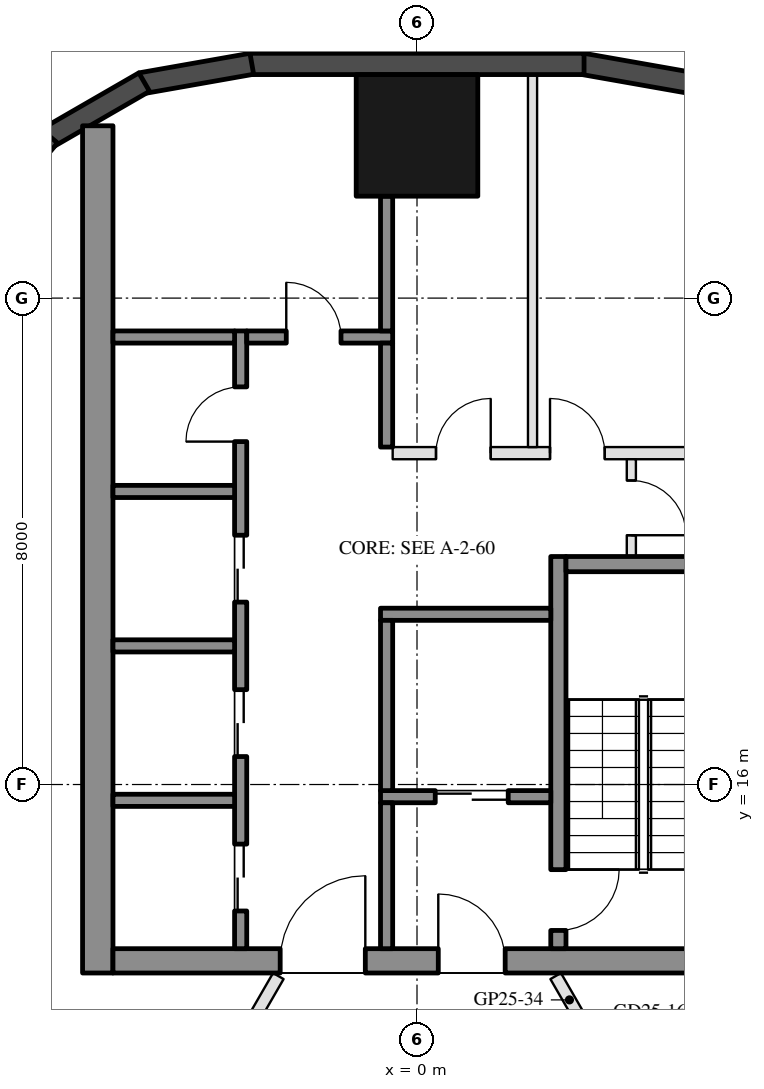
"""IFC4 building model, lengths in metres.
Left out: names, types, materials, properties, quantities, classifications, styles, units other than length and angle.
Written with IfcOpenShell. Run it as: python <this file> out.ifc"""

import sys

from ifc_helpers import new_model, si_unit, direction, frame, frame_2d, origin, origin_2d, place, context, subcontext, project, spatial, rectangle, hollow_rectangle, extrude, boolean, halfspace, element, fill, save


model = new_model("IFC4")
c1 = context("Model", 3, precision=1e-05, world=origin(), true_north=direction((0.0, 1.0)))
c2 = subcontext(c1, "Body", "Model", "MODEL_VIEW")
j1 = project(units=[si_unit("LENGTHUNIT", "METRE"), si_unit("PLANEANGLEUNIT", "RADIAN")], contexts=[c1])
p1 = place(None, origin())
s1 = spatial("IfcSite", under=j1, at=p1, CompositionType="ELEMENT")
p2 = place(p1, origin())
s2 = spatial("IfcBuilding", under=s1, at=p2, CompositionType="ELEMENT")
p3 = place(p2, frame((0.0, 0.0, 257.8)))
s3 = spatial("IfcBuildingStorey", under=s2, at=p3, CompositionType="ELEMENT", Elevation=257.8)
p4 = place(p3, frame((0.0, 26.676, 0.0), z_axis=(0.0, 0.0, 1.0), x_axis=(1.0, 0.0, 0.0)))
e1 = element("IfcColumn", 1, at=p4, inside=s3, PredefinedType="COLUMN", context=c2, shape_type="SweptSolid", body=[
    boolean("DIFFERENCE", extrude(hollow_rectangle(XDim=2.0, YDim=2.0, WallThickness=0.05, at=origin_2d()), origin(), (0.0, 0.0, 1.0), 3.7), halfspace(frame((0.0, 0.0, 0.112), z_axis=(0.0, 0.0, 1.0), x_axis=(1.0, 0.0, 0.0)), True)),
])
p5 = place(p3, frame((6.093, 26.625, 0.0), z_axis=(0.0, 0.0, 1.0), x_axis=(-0.866080385203, 0.499904757295, 0.0)))
e2 = element("IfcWall", 2, at=p5, inside=s3, PredefinedType="SOLIDWALL", context=c2, shape_type="SweptSolid", body=[
    extrude(rectangle(XDim=1.855, YDim=0.35, at=frame_2d((0.927, 0.0))), origin(), (0.0, 0.0, 1.0), 3.55),
])
p6 = place(p3, frame((4.544, 27.532, 0.0), z_axis=(0.0, 0.0, 1.0), x_axis=(-0.984795480386, 0.173717764815, 0.0)))
e3 = element("IfcWall", 3, at=p6, inside=s3, PredefinedType="SOLIDWALL", context=c2, shape_type="SweptSolid", body=[
    extrude(rectangle(XDim=1.855, YDim=0.35, at=frame_2d((0.928, 0.0))), origin(), (0.0, 0.0, 1.0), 3.55),
])
p7 = place(p3, frame((2.747, 27.851, 0.0), z_axis=(0.0, 0.0, 1.0), x_axis=(-1.0, 0.0, 0.0)))
e4 = element("IfcWall", 4, at=p7, inside=s3, PredefinedType="SOLIDWALL", context=c2, shape_type="SweptSolid", body=[
    extrude(rectangle(XDim=5.495, YDim=0.35, at=frame_2d((2.747, 0.0))), origin(), (0.0, 0.0, 1.0), 3.55),
])
p8 = place(p3, frame((-2.717, 27.854, 0.0), z_axis=(0.0, 0.0, 1.0), x_axis=(-0.984795480386, -0.173717764815, 0.0)))
e5 = element("IfcWall", 5, at=p8, inside=s3, PredefinedType="SOLIDWALL", context=c2, shape_type="SweptSolid", body=[
    extrude(rectangle(XDim=1.855, YDim=0.35, at=frame_2d((0.928, 0.0))), origin(), (0.0, 0.0, 1.0), 3.55),
])
p9 = place(p3, frame((-4.487, 27.552, 0.0), z_axis=(0.0, 0.0, 1.0), x_axis=(-0.866080385203, -0.499904757295, 0.0)))
e6 = element("IfcWall", 6, at=p9, inside=s3, PredefinedType="SOLIDWALL", context=c2, shape_type="SweptSolid", body=[
    extrude(rectangle(XDim=1.855, YDim=0.35, at=frame_2d((0.927, 0.0))), origin(), (0.0, 0.0, 1.0), 3.55),
])
p10 = place(p3, frame((-6.046, 26.664, 0.0), z_axis=(0.0, 0.0, 1.0), x_axis=(-0.642756798522, -0.7660702957, 0.0)))
e7 = element("IfcWall", 7, at=p10, inside=s3, PredefinedType="SOLIDWALL", context=c2, shape_type="SweptSolid", body=[
    extrude(rectangle(XDim=1.855, YDim=0.35, at=frame_2d((0.928, 0.0))), origin(), (0.0, 0.0, 1.0), 3.55),
])
p11 = place(p3, frame((-5.25, 12.9, 0.0), z_axis=(0.0, 0.0, 1.0), x_axis=(0.0, 1.0, 0.0)))
e8 = element("IfcWall", 8, at=p11, inside=s3, PredefinedType="SHEAR", context=c2, shape_type="SweptSolid", body=[
    extrude(rectangle(XDim=13.934, YDim=0.5, at=frame_2d((6.967, 0.0))), origin(), (0.0, 0.0, 1.0), 3.5),
])
p12 = place(p3, frame((5.0, 13.1, 0.0), z_axis=(0.0, 0.0, 1.0), x_axis=(-1.0, 0.0, 0.0)))
e9 = element("IfcWall", 9, at=p12, inside=s3, PredefinedType="SHEAR", context=c2, shape_type="SweptSolid", body=[
    extrude(rectangle(XDim=10.0, YDim=0.4, at=frame_2d((5.0, 0.0))), origin(), (0.0, 0.0, 1.0), 3.5),
])
p13 = place(p12, frame((3.55, 0.0, 0.0)))
e10 = element("IfcOpeningElement", 10, at=p13, cuts=e9, PredefinedType="OPENING", context=c2, shape_type="SweptSolid", body=[
    extrude(rectangle(XDim=1.1, YDim=2.1, at=frame_2d((0.55, 1.05))), frame((0.0, 0.21, 0.0), z_axis=(0.0, -1.0, 0.0), x_axis=(1.0, 0.0, 0.0)), (0.0, 0.0, 1.0), 0.42),
])
p14 = place(p12, frame((5.85, 0.0, 0.0)))
e11 = element("IfcOpeningElement", 11, at=p14, cuts=e9, PredefinedType="OPENING", context=c2, shape_type="SweptSolid", body=[
    extrude(rectangle(XDim=1.4, YDim=2.1, at=frame_2d((0.7, 1.05))), frame((0.0, 0.21, 0.0), z_axis=(0.0, -1.0, 0.0), x_axis=(1.0, 0.0, 0.0)), (0.0, 0.0, 1.0), 0.42),
])
p15 = place(p3, frame((2.325, 13.3, 0.0), z_axis=(0.0, 0.0, 1.0), x_axis=(0.0, 1.0, 0.0)))
e12 = element("IfcWall", 12, at=p15, inside=s3, PredefinedType="SHEAR", context=c2, shape_type="SweptSolid", body=[
    extrude(rectangle(XDim=6.45, YDim=0.25, at=frame_2d((3.225, 0.0))), origin(), (0.0, 0.0, 1.0), 3.5),
])
p16 = place(p15, frame((0.3, 0.0, 0.0)))
e13 = element("IfcOpeningElement", 13, at=p16, cuts=e12, PredefinedType="OPENING", context=c2, shape_type="SweptSolid", body=[
    extrude(rectangle(XDim=1.0, YDim=2.1, at=frame_2d((0.5, 1.05))), frame((0.0, 0.135, 0.0), z_axis=(0.0, -1.0, 0.0), x_axis=(1.0, 0.0, 0.0)), (0.0, 0.0, 1.0), 0.27),
])
p17 = place(p3, frame((5.0, 19.625, 0.0), z_axis=(0.0, 0.0, 1.0), x_axis=(-1.0, 0.0, 0.0)))
e14 = element("IfcWall", 14, at=p17, inside=s3, PredefinedType="SHEAR", context=c2, shape_type="SweptSolid", body=[
    extrude(rectangle(XDim=2.55, YDim=0.25, at=frame_2d((1.275, 0.0))), origin(), (0.0, 0.0, 1.0), 3.5),
])
p18 = place(p3, frame((2.2, 18.8, 0.0), z_axis=(0.0, 0.0, 1.0), x_axis=(-1.0, 0.0, 0.0)))
e15 = element("IfcWall", 15, at=p18, inside=s3, PredefinedType="SHEAR", context=c2, shape_type="SweptSolid", body=[
    extrude(rectangle(XDim=2.8, YDim=0.2, at=frame_2d((1.4, 0.0))), origin(), (0.0, 0.0, 1.0), 3.5),
])
p19 = place(p3, frame((2.2, 15.8, 0.0), z_axis=(0.0, 0.0, 1.0), x_axis=(-1.0, 0.0, 0.0)))
e16 = element("IfcWall", 16, at=p19, inside=s3, PredefinedType="SHEAR", context=c2, shape_type="SweptSolid", body=[
    extrude(rectangle(XDim=2.8, YDim=0.2, at=frame_2d((1.4, 0.0))), origin(), (0.0, 0.0, 1.0), 3.5),
])
p20 = place(p19, frame((0.7, 0.0, 0.0)))
e17 = element("IfcOpeningElement", 17, at=p20, cuts=e16, PredefinedType="OPENING", context=c2, shape_type="SweptSolid", body=[
    extrude(rectangle(XDim=1.2, YDim=2.1, at=frame_2d((0.6, 1.05))), frame((0.0, 0.11, 0.0), z_axis=(0.0, -1.0, 0.0), x_axis=(1.0, 0.0, 0.0)), (0.0, 0.0, 1.0), 0.22),
])
p21 = place(p3, frame((-0.5, 15.9, 0.0), z_axis=(0.0, 0.0, 1.0), x_axis=(0.0, 1.0, 0.0)))
e18 = element("IfcWall", 18, at=p21, inside=s3, PredefinedType="SHEAR", context=c2, shape_type="SweptSolid", body=[
    extrude(rectangle(XDim=2.8, YDim=0.2, at=frame_2d((1.4, 0.0))), origin(), (0.0, 0.0, 1.0), 3.5),
])
p22 = place(p3, frame((-0.5, 13.3, 0.0), z_axis=(0.0, 0.0, 1.0), x_axis=(0.0, 1.0, 0.0)))
e19 = element("IfcWall", 19, at=p22, inside=s3, PredefinedType="SHEAR", context=c2, shape_type="SweptSolid", body=[
    extrude(rectangle(XDim=2.4, YDim=0.2, at=frame_2d((1.2, 0.0))), origin(), (0.0, 0.0, 1.0), 3.5),
])
p23 = place(p3, frame((-2.9, 13.3, 0.0), z_axis=(0.0, 0.0, 1.0), x_axis=(0.0, 1.0, 0.0)))
e20 = element("IfcWall", 20, at=p23, inside=s3, PredefinedType="SHEAR", context=c2, shape_type="SweptSolid", body=[
    extrude(rectangle(XDim=10.16, YDim=0.2, at=frame_2d((5.08, 0.0))), origin(), (0.0, 0.0, 1.0), 3.5),
])
p24 = place(p23, frame((0.62, 0.0, 0.0)))
e21 = element("IfcOpeningElement", 21, at=p24, cuts=e20, PredefinedType="OPENING", context=c2, shape_type="SweptSolid", body=[
    extrude(rectangle(XDim=1.1, YDim=2.1, at=frame_2d((0.55, 1.05))), frame((0.0, 0.11, 0.0), z_axis=(0.0, -1.0, 0.0), x_axis=(1.0, 0.0, 0.0)), (0.0, 0.0, 1.0), 0.22),
])
p25 = place(p23, frame((3.16, 0.0, 0.0)))
e22 = element("IfcOpeningElement", 22, at=p25, cuts=e20, PredefinedType="OPENING", context=c2, shape_type="SweptSolid", body=[
    extrude(rectangle(XDim=1.1, YDim=2.1, at=frame_2d((0.55, 1.05))), frame((0.0, 0.11, 0.0), z_axis=(0.0, -1.0, 0.0), x_axis=(1.0, 0.0, 0.0)), (0.0, 0.0, 1.0), 0.22),
])
p26 = place(p23, frame((5.7, 0.0, 0.0)))
e23 = element("IfcOpeningElement", 23, at=p26, cuts=e20, PredefinedType="OPENING", context=c2, shape_type="SweptSolid", body=[
    extrude(rectangle(XDim=1.1, YDim=2.1, at=frame_2d((0.55, 1.05))), frame((0.0, 0.11, 0.0), z_axis=(0.0, -1.0, 0.0), x_axis=(1.0, 0.0, 0.0)), (0.0, 0.0, 1.0), 0.22),
])
p27 = place(p23, frame((8.34, 0.0, 0.0)))
e24 = element("IfcOpeningElement", 24, at=p27, cuts=e20, PredefinedType="OPENING", context=c2, shape_type="SweptSolid", body=[
    extrude(rectangle(XDim=0.9, YDim=2.1, at=frame_2d((0.45, 1.05))), frame((0.0, 0.11, 0.0), z_axis=(0.0, -1.0, 0.0), x_axis=(1.0, 0.0, 0.0)), (0.0, 0.0, 1.0), 0.22),
])
p28 = place(p3, frame((-0.4, 23.36, 0.0), z_axis=(0.0, 0.0, 1.0), x_axis=(-1.0, 0.0, 0.0)))
e25 = element("IfcWall", 25, at=p28, inside=s3, PredefinedType="SHEAR", context=c2, shape_type="SweptSolid", body=[
    extrude(rectangle(XDim=2.4, YDim=0.2, at=frame_2d((1.2, 0.0))), origin(), (0.0, 0.0, 1.0), 3.5),
])
p29 = place(p28, frame((0.85, 0.0, 0.0)))
e26 = element("IfcOpeningElement", 26, at=p29, cuts=e25, PredefinedType="OPENING", context=c2, shape_type="SweptSolid", body=[
    extrude(rectangle(XDim=0.9, YDim=2.1, at=frame_2d((0.45, 1.05))), frame((0.0, 0.11, 0.0), z_axis=(0.0, -1.0, 0.0), x_axis=(1.0, 0.0, 0.0)), (0.0, 0.0, 1.0), 0.22),
])
p30 = place(p3, frame((-0.5, 21.55, 0.0), z_axis=(0.0, 0.0, 1.0), x_axis=(0.0, 1.0, 0.0)))
e27 = element("IfcWall", 27, at=p30, inside=s3, PredefinedType="SHEAR", context=c2, shape_type="SweptSolid", body=[
    extrude(rectangle(XDim=1.71, YDim=0.2, at=frame_2d((0.855, 0.0))), origin(), (0.0, 0.0, 1.0), 3.5),
])
for number, where, z_axis, x_axis in (
    (28, (-3.0, 15.74, 0.0), (0.0, 0.0, 1.0), (-1.0, 0.0, 0.0)),
    (29, (-3.0, 18.28, 0.0), (0.0, 0.0, 1.0), (-1.0, 0.0, 0.0)),
    (30, (-3.0, 20.82, 0.0), (0.0, 0.0, 1.0), (-1.0, 0.0, 0.0)),
    (31, (-3.0, 23.36, 0.0), (0.0, 0.0, 1.0), (-1.0, 0.0, 0.0)),
):
    element("IfcWall", number, at=place(p3, frame(where, z_axis=z_axis, x_axis=x_axis)), inside=s3, PredefinedType="SHEAR", context=c2, shape_type="SweptSolid", body=[
        extrude(rectangle(XDim=2.0, YDim=0.2, at=frame_2d((1.0, 0.0))), origin(), (0.0, 0.0, 1.0), 3.5),
    ])
p31 = place(p3, frame((-0.5, 23.46, 0.0), z_axis=(0.0, 0.0, 1.0), x_axis=(0.0, 1.0, 0.0)))
e32 = element("IfcWall", 32, at=p31, inside=s3, PredefinedType="SHEAR", context=c2, shape_type="SweptSolid", body=[
    extrude(rectangle(XDim=2.216, YDim=0.2, at=frame_2d((1.108, 0.0))), origin(), (0.0, 0.0, 1.0), 3.5),
])
p32 = place(p3, frame((5.0, 21.45, 0.0), z_axis=(0.0, 0.0, 1.0), x_axis=(-1.0, 0.0, 0.0)))
e33 = element("IfcWall", 33, at=p32, inside=s3, PredefinedType="PARTITIONING", context=c2, shape_type="SweptSolid", body=[
    extrude(rectangle(XDim=5.4, YDim=0.2, at=frame_2d((2.7, 0.0))), origin(), (0.0, 0.0, 1.0), 3.5),
])
p33 = place(p32, frame((1.913, 0.0, 0.0)))
e34 = element("IfcOpeningElement", 34, at=p33, cuts=e33, PredefinedType="OPENING", context=c2, shape_type="SweptSolid", body=[
    extrude(rectangle(XDim=0.9, YDim=2.1, at=frame_2d((0.45, 1.05))), frame((0.0, 0.11, 0.0), z_axis=(0.0, -1.0, 0.0), x_axis=(1.0, 0.0, 0.0)), (0.0, 0.0, 1.0), 0.22),
])
p34 = place(p32, frame((3.788, 0.0, 0.0)))
e35 = element("IfcOpeningElement", 35, at=p34, cuts=e33, PredefinedType="OPENING", context=c2, shape_type="SweptSolid", body=[
    extrude(rectangle(XDim=0.9, YDim=2.1, at=frame_2d((0.45, 1.05))), frame((0.0, 0.11, 0.0), z_axis=(0.0, -1.0, 0.0), x_axis=(1.0, 0.0, 0.0)), (0.0, 0.0, 1.0), 0.22),
])
p35 = place(p3, frame((3.525, 19.75, 0.0), z_axis=(0.0, 0.0, 1.0), x_axis=(0.0, 1.0, 0.0)))
e36 = element("IfcWall", 36, at=p35, inside=s3, PredefinedType="PARTITIONING", context=c2, shape_type="SweptSolid", body=[
    extrude(rectangle(XDim=1.6, YDim=0.15, at=frame_2d((0.8, 0.0))), origin(), (0.0, 0.0, 1.0), 3.5),
])
p36 = place(p35, frame((0.35, 0.0, 0.0)))
e37 = element("IfcOpeningElement", 37, at=p36, cuts=e36, PredefinedType="OPENING", context=c2, shape_type="SweptSolid", body=[
    extrude(rectangle(XDim=0.9, YDim=2.1, at=frame_2d((0.45, 1.05))), frame((0.0, 0.085, 0.0), z_axis=(0.0, -1.0, 0.0), x_axis=(1.0, 0.0, 0.0)), (0.0, 0.0, 1.0), 0.17),
])
p37 = place(p3, frame((1.9, 21.55, 0.0), z_axis=(0.0, 0.0, 1.0), x_axis=(0.0, 1.0, 0.0)))
e38 = element("IfcWall", 38, at=p37, inside=s3, PredefinedType="PARTITIONING", context=c2, shape_type="SweptSolid", body=[
    extrude(rectangle(XDim=6.126, YDim=0.15, at=frame_2d((3.063, 0.0))), origin(), (0.0, 0.0, 1.0), 3.5),
])
p38 = place(p3, frame((13.766, 13.583, 0.0), z_axis=(0.0, 0.0, 1.0), x_axis=(-0.919210042537, -0.393767568115, 0.0)))
e39 = element("IfcWall", 39, at=p38, inside=s3, PredefinedType="PARTITIONING", context=c2, shape_type="SweptSolid", body=[
    extrude(rectangle(XDim=10.487, YDim=0.2, at=frame_2d((5.243, 0.0))), origin(), (0.0, 0.0, 1.0), 3.16),
])
p39 = place(p3, frame((-13.177, 12.804, 0.0), z_axis=(0.0, 0.0, 1.0), x_axis=(0.866021901412, -0.500006066238, 0.0)))
e40 = element("IfcWall", 40, at=p39, inside=s3, PredefinedType="PARTITIONING", context=c2, shape_type="SweptSolid", body=[
    extrude(rectangle(XDim=9.513, YDim=0.2, at=frame_2d((4.757, 0.0))), origin(), (0.0, 0.0, 1.0), 3.16),
])
p40 = place(p3, frame((2.281, 12.85, 0.0), z_axis=(0.0, 0.0, 1.0), x_axis=(0.499978071388, -0.866038063904, 0.0)))
e41 = element("IfcWall", 41, at=p40, inside=s3, PredefinedType="PARTITIONING", context=c2, shape_type="SweptSolid", body=[
    extrude(rectangle(XDim=3.776, YDim=0.2, at=frame_2d((1.888, 0.0))), origin(), (0.0, 0.0, 1.0), 3.0),
])
p41 = place(p40, frame((1.388, 0.0, 0.0)))
e42 = element("IfcOpeningElement", 42, at=p41, cuts=e41, PredefinedType="OPENING", context=c2, shape_type="SweptSolid", body=[
    extrude(rectangle(XDim=1.0, YDim=2.1, at=frame_2d((0.5, 1.05))), frame((0.0, 0.11, 0.0), z_axis=(0.0, -1.0, 0.0), x_axis=(1.0, 0.0, 0.0)), (0.0, 0.0, 1.0), 0.22),
])
p42 = place(p3, frame((-4.975, 8.184, 0.0), z_axis=(0.0, 0.0, 1.0), x_axis=(0.499983925036, 0.86603468447, 0.0)))
e43 = element("IfcWall", 43, at=p42, inside=s3, PredefinedType="PARTITIONING", context=c2, shape_type="SweptSolid", body=[
    extrude(rectangle(XDim=5.388, YDim=0.2, at=frame_2d((2.694, 0.0))), origin(), (0.0, 0.0, 1.0), 3.0),
])
p43 = place(p42, frame((2.194, 0.0, 0.0)))
e44 = element("IfcOpeningElement", 44, at=p43, cuts=e43, PredefinedType="OPENING", context=c2, shape_type="SweptSolid", body=[
    extrude(rectangle(XDim=1.0, YDim=2.1, at=frame_2d((0.5, 1.05))), frame((0.0, 0.11, 0.0), z_axis=(0.0, -1.0, 0.0), x_axis=(1.0, 0.0, 0.0)), (0.0, 0.0, 1.0), 0.22),
])
p44 = place(p20, origin())
e45 = element("IfcDoor", 45, at=p44, inside=s3, OperationType="DOUBLE_DOOR_SLIDING", PredefinedType="DOOR", context=c2, shape_type="SweptSolid", body=[
    extrude(rectangle(XDim=1.2, YDim=2.1, at=frame_2d((0.6, 1.05))), frame((0.0, 0.025, 0.0), z_axis=(0.0, -1.0, 0.0), x_axis=(1.0, 0.0, 0.0)), (0.0, 0.0, 1.0), 0.05),
])
fill(e17, e45)
p45 = place(p36, frame((0.9, 0.0, 0.0), z_axis=(0.0, 0.0, 1.0), x_axis=(-1.0, 0.0, 0.0)))
e46 = element("IfcDoor", 46, at=p45, inside=s3, OperationType="SINGLE_SWING_RIGHT", PredefinedType="DOOR", context=c2, shape_type="SweptSolid", body=[
    extrude(rectangle(XDim=0.9, YDim=2.1, at=frame_2d((0.45, 1.05))), frame((0.0, 0.025, 0.0), z_axis=(0.0, -1.0, 0.0), x_axis=(1.0, 0.0, 0.0)), (0.0, 0.0, 1.0), 0.05),
])
fill(e37, e46)
p46 = place(p24, origin())
e47 = element("IfcDoor", 47, at=p46, inside=s3, OperationType="DOUBLE_DOOR_SLIDING", PredefinedType="DOOR", context=c2, shape_type="SweptSolid", body=[
    extrude(rectangle(XDim=1.1, YDim=2.1, at=frame_2d((0.55, 1.05))), frame((0.0, 0.025, 0.0), z_axis=(0.0, -1.0, 0.0), x_axis=(1.0, 0.0, 0.0)), (0.0, 0.0, 1.0), 0.05),
])
fill(e21, e47)
p47 = place(p25, origin())
e48 = element("IfcDoor", 48, at=p47, inside=s3, OperationType="DOUBLE_DOOR_SLIDING", PredefinedType="DOOR", context=c2, shape_type="SweptSolid", body=[
    extrude(rectangle(XDim=1.1, YDim=2.1, at=frame_2d((0.55, 1.05))), frame((0.0, 0.025, 0.0), z_axis=(0.0, -1.0, 0.0), x_axis=(1.0, 0.0, 0.0)), (0.0, 0.0, 1.0), 0.05),
])
fill(e22, e48)
p48 = place(p26, origin())
e49 = element("IfcDoor", 49, at=p48, inside=s3, OperationType="DOUBLE_DOOR_SLIDING", PredefinedType="DOOR", context=c2, shape_type="SweptSolid", body=[
    extrude(rectangle(XDim=1.1, YDim=2.1, at=frame_2d((0.55, 1.05))), frame((0.0, 0.025, 0.0), z_axis=(0.0, -1.0, 0.0), x_axis=(1.0, 0.0, 0.0)), (0.0, 0.0, 1.0), 0.05),
])
fill(e23, e49)
p49 = place(p27, origin())
e50 = element("IfcDoor", 50, at=p49, inside=s3, OperationType="SINGLE_SWING_LEFT", PredefinedType="DOOR", context=c2, shape_type="SweptSolid", body=[
    extrude(rectangle(XDim=0.9, YDim=2.1, at=frame_2d((0.45, 1.05))), frame((0.0, 0.025, 0.0), z_axis=(0.0, -1.0, 0.0), x_axis=(1.0, 0.0, 0.0)), (0.0, 0.0, 1.0), 0.05),
])
fill(e24, e50)
p50 = place(p29, frame((0.9, 0.0, 0.0), z_axis=(0.0, 0.0, 1.0), x_axis=(-1.0, 0.0, 0.0)))
e51 = element("IfcDoor", 51, at=p50, inside=s3, OperationType="SINGLE_SWING_LEFT", PredefinedType="DOOR", context=c2, shape_type="SweptSolid", body=[
    extrude(rectangle(XDim=0.9, YDim=2.1, at=frame_2d((0.45, 1.05))), frame((0.0, 0.025, 0.0), z_axis=(0.0, -1.0, 0.0), x_axis=(1.0, 0.0, 0.0)), (0.0, 0.0, 1.0), 0.05),
])
fill(e26, e51)
p51 = place(p33, frame((0.9, 0.0, 0.0), z_axis=(0.0, 0.0, 1.0), x_axis=(-1.0, 0.0, 0.0)))
e52 = element("IfcDoor", 52, at=p51, inside=s3, OperationType="SINGLE_SWING_LEFT", PredefinedType="DOOR", context=c2, shape_type="SweptSolid", body=[
    extrude(rectangle(XDim=0.9, YDim=2.1, at=frame_2d((0.45, 1.05))), frame((0.0, 0.025, 0.0), z_axis=(0.0, -1.0, 0.0), x_axis=(1.0, 0.0, 0.0)), (0.0, 0.0, 1.0), 0.05),
])
fill(e34, e52)
p52 = place(p34, frame((0.9, 0.0, 0.0), z_axis=(0.0, 0.0, 1.0), x_axis=(-1.0, 0.0, 0.0)))
e53 = element("IfcDoor", 53, at=p52, inside=s3, OperationType="SINGLE_SWING_RIGHT", PredefinedType="DOOR", context=c2, shape_type="SweptSolid", body=[
    extrude(rectangle(XDim=0.9, YDim=2.1, at=frame_2d((0.45, 1.05))), frame((0.0, 0.025, 0.0), z_axis=(0.0, -1.0, 0.0), x_axis=(1.0, 0.0, 0.0)), (0.0, 0.0, 1.0), 0.05),
])
fill(e35, e53)
p53 = place(p13, frame((1.1, 0.0, 0.0), z_axis=(0.0, 0.0, 1.0), x_axis=(-1.0, 0.0, 0.0)))
e54 = element("IfcDoor", 54, at=p53, inside=s3, OperationType="SINGLE_SWING_LEFT", PredefinedType="DOOR", context=c2, shape_type="SweptSolid", body=[
    extrude(rectangle(XDim=1.1, YDim=2.1, at=frame_2d((0.55, 1.05))), frame((0.0, 0.025, 0.0), z_axis=(0.0, -1.0, 0.0), x_axis=(1.0, 0.0, 0.0)), (0.0, 0.0, 1.0), 0.05),
])
fill(e10, e54)
p54 = place(p14, frame((1.4, 0.0, 0.0), z_axis=(0.0, 0.0, 1.0), x_axis=(-1.0, 0.0, 0.0)))
e55 = element("IfcDoor", 55, at=p54, inside=s3, OperationType="DOUBLE_DOOR_SINGLE_SWING", PredefinedType="DOOR", context=c2, shape_type="SweptSolid", body=[
    extrude(rectangle(XDim=1.4, YDim=2.1, at=frame_2d((0.7, 1.05))), frame((0.0, 0.025, 0.0), z_axis=(0.0, -1.0, 0.0), x_axis=(1.0, 0.0, 0.0)), (0.0, 0.0, 1.0), 0.05),
])
fill(e11, e55)
p55 = place(p16, frame((1.0, 0.0, 0.0), z_axis=(0.0, 0.0, 1.0), x_axis=(-1.0, 0.0, 0.0)))
e56 = element("IfcDoor", 56, at=p55, inside=s3, OperationType="SINGLE_SWING_LEFT", PredefinedType="DOOR", context=c2, shape_type="SweptSolid", body=[
    extrude(rectangle(XDim=1.0, YDim=2.1, at=frame_2d((0.5, 1.05))), frame((0.0, 0.025, 0.0), z_axis=(0.0, -1.0, 0.0), x_axis=(1.0, 0.0, 0.0)), (0.0, 0.0, 1.0), 0.05),
])
fill(e13, e56)
save(model, sys.argv[1])
